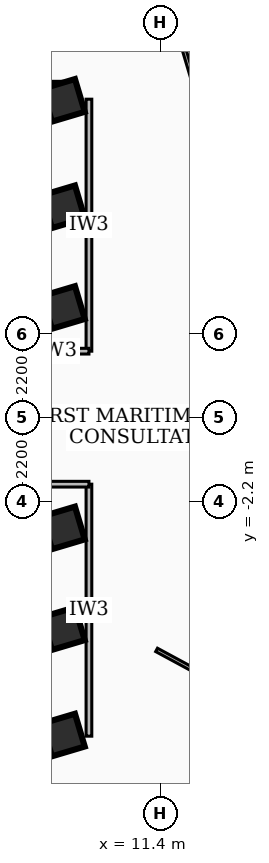
"""IFC4 building model, lengths in metres.
Left out: names, types, materials, properties, quantities, classifications, styles, units other than length and angle.
Written with IfcOpenShell. Run it as: python <this file> out.ifc"""

import sys

from ifc_helpers import new_model, si_unit, direction, frame, frame_2d, origin, origin_2d, place, context, subcontext, project, spatial, rectangle, extrude, element, save


model = new_model("IFC4")
c1 = context("Model", 3, precision=1e-05, world=origin(), true_north=direction((0.0, 1.0)))
c2 = subcontext(c1, "Body", "Model", "MODEL_VIEW")
j1 = project(units=[si_unit("LENGTHUNIT", "METRE"), si_unit("PLANEANGLEUNIT", "RADIAN")], contexts=[c1])
p1 = place(None, origin())
s1 = spatial("IfcSite", under=j1, at=p1, CompositionType="ELEMENT")
p2 = place(p1, origin())
s2 = spatial("IfcBuilding", under=s1, at=p2, CompositionType="ELEMENT")
p3 = place(p2, frame((0.0, 0.0, 145.08)))
s3 = spatial("IfcBuildingStorey", under=s2, at=p3, CompositionType="ELEMENT", Elevation=145.08)
for number, where, z_axis, x_axis in (
    (1, (-8.78, 8.56, 0.0), (0.0, 0.0, 1.0), (1.0, 0.0, 0.0)),
    (2, (8.78, -8.56, 0.0), (0.0, 0.0, 1.0), (-1.0, 0.0, 0.0)),
):
    element("IfcWall", number, at=place(p3, frame(where, z_axis=z_axis, x_axis=x_axis)), inside=s3, PredefinedType="SHEAR", context=c2, shape_type="SweptSolid", body=[
        extrude(rectangle(XDim=17.56, YDim=0.5, at=frame_2d((8.78, 0.0))), origin(), (0.0, 0.0, 1.0), 3.32),
    ])
for number, where, z_axis, x_axis in (
    (3, (8.85, -5.55, 0.0), (0.0, 0.0, 1.0), (0.958, 0.286, 0.0)),
    (4, (8.85, -2.9, 0.0), (0.0, 0.0, 1.0), (0.958, 0.286, 0.0)),
    (5, (8.85, 2.9, 0.0), (0.0, 0.0, 1.0), (0.958, 0.286, 0.0)),
    (6, (8.85, 5.55, 0.0), (0.0, 0.0, 1.0), (0.958, 0.286, 0.0)),
    (7, (8.85, -8.35, 0.0), (0.0, 0.0, 1.0), (0.958, 0.286, 0.0)),
    (8, (8.85, 8.35, 0.0), (0.0, 0.0, 1.0), (0.958, 0.286, 0.0)),
):
    element("IfcColumn", number, at=place(p3, frame(where, z_axis=z_axis, x_axis=x_axis)), inside=s3, PredefinedType="COLUMN", context=c2, shape_type="SweptSolid", body=[
        extrude(rectangle(XDim=0.9, YDim=0.9, at=origin_2d()), origin(), (0.0, 0.0, 1.0), 3.6),
    ])
p4 = place(p3, frame((9.52, 1.75, 0.0), z_axis=(0.0, 0.0, 1.0), x_axis=(0.0, 1.0, 0.0)))
e9 = element("IfcWall", 9, at=p4, inside=s3, PredefinedType="PARTITIONING", context=c2, shape_type="SweptSolid", body=[
    extrude(rectangle(XDim=6.63, YDim=0.15, at=frame_2d((3.315, 0.0))), origin(), (0.0, 0.0, 1.0), 2.55),
])
p5 = place(p3, frame((7.85, 1.75, 0.0), z_axis=(0.0, 0.0, 1.0), x_axis=(1.0, 0.0, 0.0)))
e10 = element("IfcWall", 10, at=p5, inside=s3, PredefinedType="PARTITIONING", context=c2, shape_type="SweptSolid", body=[
    extrude(rectangle(XDim=1.67, YDim=0.15, at=frame_2d((0.835, 0.0))), origin(), (0.0, 0.0, 1.0), 2.55),
])
p6 = place(p3, frame((9.52, -8.38, 0.0), z_axis=(0.0, 0.0, 1.0), x_axis=(0.0, 1.0, 0.0)))
e11 = element("IfcWall", 11, at=p6, inside=s3, PredefinedType="PARTITIONING", context=c2, shape_type="SweptSolid", body=[
    extrude(rectangle(XDim=6.63, YDim=0.15, at=frame_2d((3.315, 0.0))), origin(), (0.0, 0.0, 1.0), 2.55),
])
p7 = place(p3, frame((7.85, -1.75, 0.0), z_axis=(0.0, 0.0, 1.0), x_axis=(1.0, 0.0, 0.0)))
e12 = element("IfcWall", 12, at=p7, inside=s3, PredefinedType="PARTITIONING", context=c2, shape_type="SweptSolid", body=[
    extrude(rectangle(XDim=1.67, YDim=0.15, at=frame_2d((0.835, 0.0))), origin(), (0.0, 0.0, 1.0), 2.55),
])
p8 = place(p3, frame((11.3, -6.11, 0.0), z_axis=(0.0, 0.0, 1.0), x_axis=(0.879653556483, -0.475614991948, 0.0)))
e13 = element("IfcWall", 13, at=p8, inside=s3, PredefinedType="PARTITIONING", context=c2, shape_type="SweptSolid", body=[
    extrude(rectangle(XDim=6.829, YDim=0.1, at=frame_2d((3.414, 0.0))), origin(), (0.0, 0.0, 1.0), 3.32),
])
p9 = place(p3, frame((10.655, 14.279, 0.0), z_axis=(0.0, 0.0, 1.0), x_axis=(0.285665949025, -0.958329257389, 0.0)))
e14 = element("IfcWall", 14, at=p9, inside=s3, PredefinedType="PARTITIONING", context=c2, shape_type="SweptSolid", body=[
    extrude(rectangle(XDim=20.66, YDim=0.1, at=frame_2d((10.33, 0.0))), origin(), (0.0, 0.0, 1.0), 2.55),
])
p10 = place(p9, frame((10.04, 0.0, 0.0)))
e15 = element("IfcOpeningElement", 15, at=p10, cuts=e14, PredefinedType="OPENING", context=c2, shape_type="SweptSolid", body=[
    extrude(rectangle(XDim=1.2, YDim=2.1, at=frame_2d((0.6, 1.05))), frame((0.0, 0.06, 0.0), z_axis=(0.0, -1.0, 0.0), x_axis=(1.0, 0.0, 0.0)), (0.0, 0.0, 1.0), 0.12),
])
save(model, sys.argv[1])
